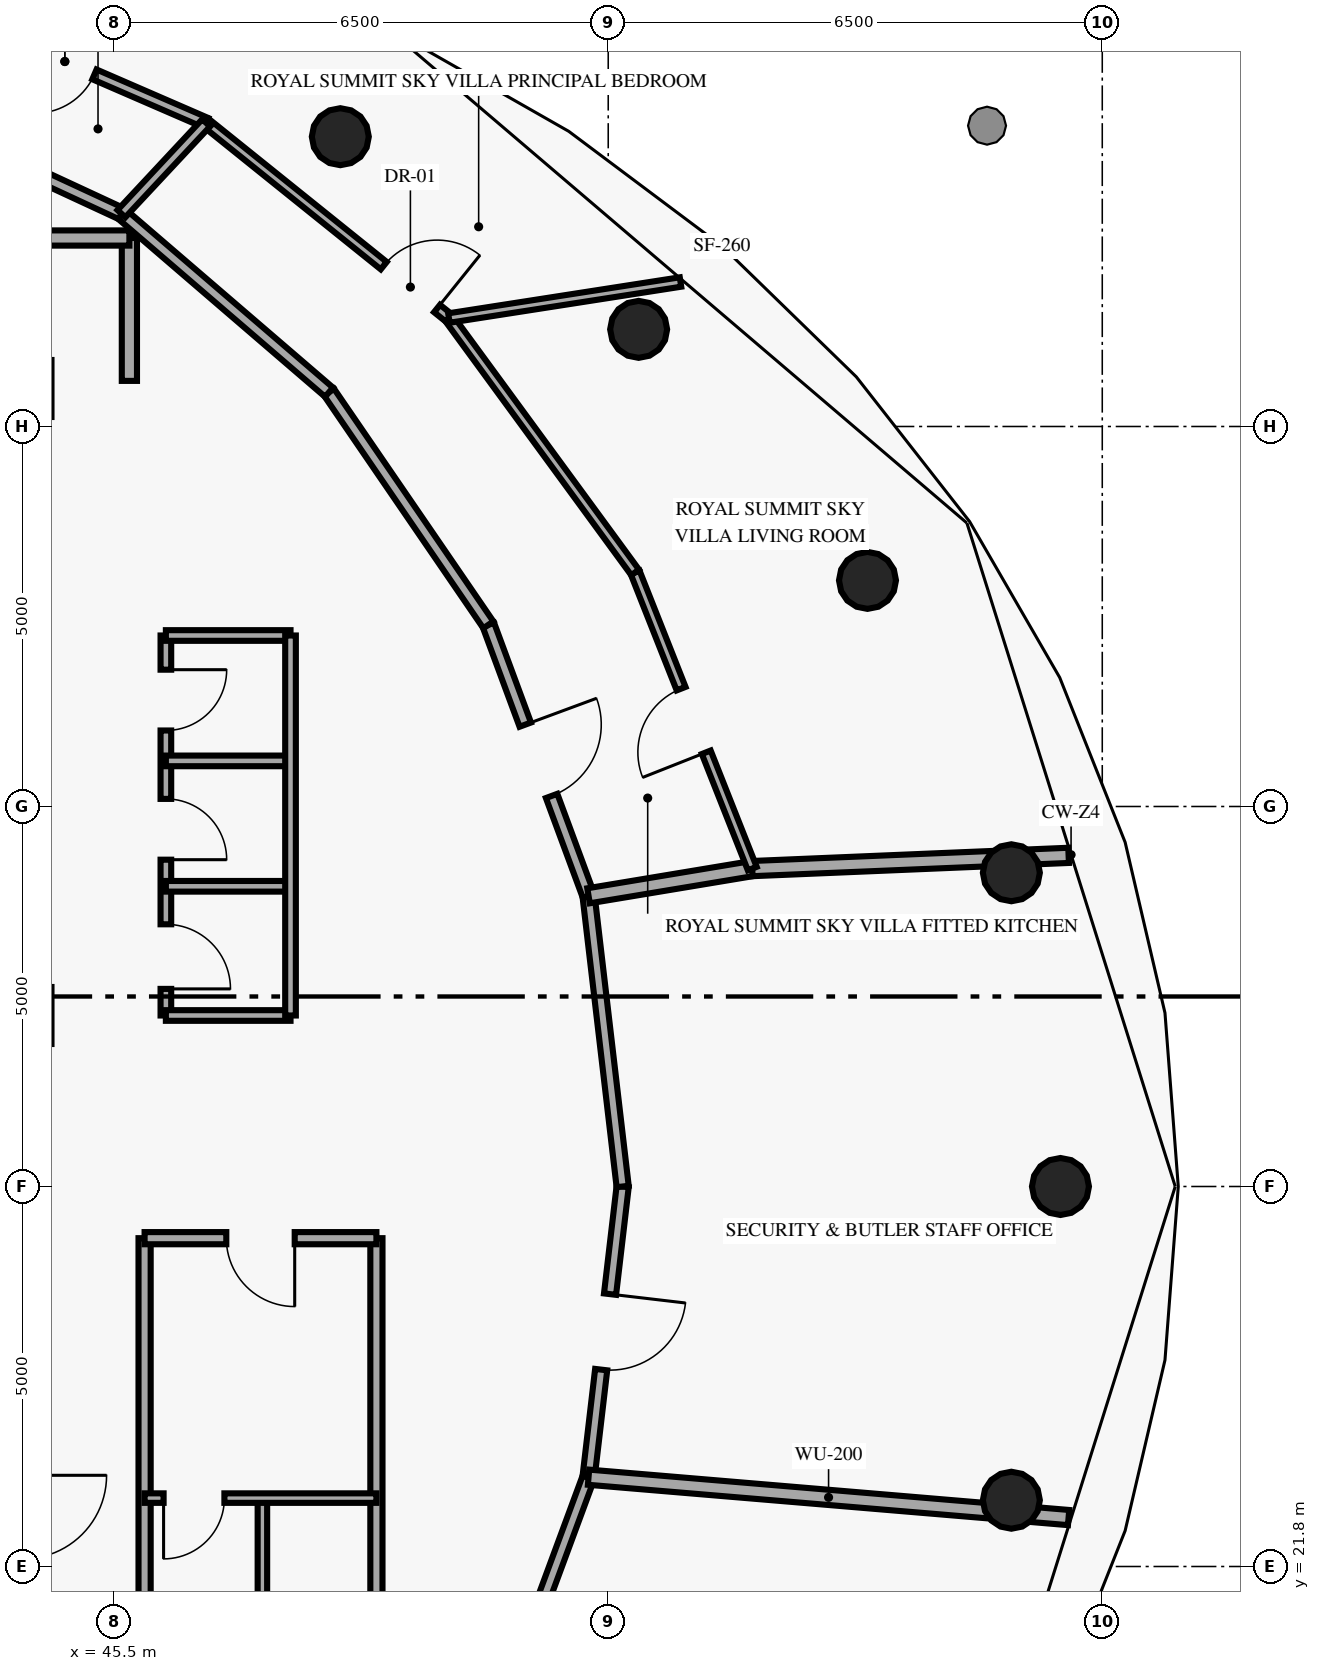
"""IFC4 building model, lengths in metres.
Left out: names, types, materials, properties, quantities, classifications, styles, units other than length and angle.
Written with IfcOpenShell. Run it as: python <this file> out.ifc"""

import sys

from ifc_helpers import new_model, si_unit, direction, frame, frame_2d, origin, origin_2d, place, context, subcontext, project, spatial, rectangle, circle, extrude, element, fill, save


model = new_model("IFC4")
c1 = context("Model", 3, precision=1e-05, world=origin(), true_north=direction((0.0, 1.0)))
c2 = subcontext(c1, "Body", "Model", "MODEL_VIEW")
j1 = project(units=[si_unit("LENGTHUNIT", "METRE"), si_unit("PLANEANGLEUNIT", "RADIAN")], contexts=[c1])
p1 = place(None, origin())
s1 = spatial("IfcSite", under=j1, at=p1, CompositionType="ELEMENT")
p2 = place(p1, origin())
s2 = spatial("IfcBuilding", under=s1, at=p2, CompositionType="ELEMENT")
p3 = place(p2, frame((0.0, 0.0, 297.4)))
s3 = spatial("IfcBuildingStorey", under=s2, at=p3, CompositionType="ELEMENT", Elevation=297.4)
for number, where, z_axis, x_axis in (
    (1, (57.95, 26.8, 0.0), (0.0, 0.0, 1.0), (1.0, 0.0, 0.0)),
    (2, (57.304, 30.928, 0.0), (0.0, 0.0, 1.0), (1.0, 0.0, 0.0)),
    (3, (55.411, 34.775, 0.0), (0.0, 0.0, 1.0), (1.0, 0.0, 0.0)),
    (4, (52.4, 38.078, 0.0), (0.0, 0.0, 1.0), (1.0, 0.0, 0.0)),
    (5, (48.475, 40.613, 0.0), (0.0, 0.0, 1.0), (1.0, 0.0, 0.0)),
    (6, (57.304, 22.672, 0.0), (0.0, 0.0, 1.0), (1.0, 0.0, 0.0)),
):
    element("IfcColumn", number, at=place(p3, frame(where, z_axis=z_axis, x_axis=x_axis)), inside=s3, PredefinedType="COLUMN", context=c2, shape_type="SweptSolid", body=[
        extrude(circle(Radius=0.375, at=origin_2d()), origin(), (0.0, 0.0, 1.0), 3.45),
    ])
p4 = place(p3, frame((45.7, 37.4, 0.0), z_axis=(0.0, 0.0, 1.0), x_axis=(0.0, 1.0, 0.0)))
e7 = element("IfcWall", 7, at=p4, inside=s3, PredefinedType="SOLIDWALL", context=c2, shape_type="SweptSolid", body=[
    extrude(rectangle(XDim=1.88, YDim=0.2, at=frame_2d((0.94, 0.0))), origin(), (0.0, 0.0, 1.0), 3.45),
])
p5 = place(p3, frame((45.7, 39.28, 0.0), z_axis=(0.0, 0.0, 1.0), x_axis=(-1.0, 0.0, 0.0)))
e8 = element("IfcWall", 8, at=p5, inside=s3, PredefinedType="SOLIDWALL", context=c2, shape_type="SweptSolid", body=[
    extrude(rectangle(XDim=6.6, YDim=0.2, at=frame_2d((3.3, 0.0))), origin(), (0.0, 0.0, 1.0), 3.45),
])
p6 = place(p5, frame((4.35, 0.0, 0.0)))
e9 = element("IfcOpeningElement", 9, at=p6, cuts=e8, PredefinedType="OPENING", context=c2, shape_type="SweptSolid", body=[
    extrude(rectangle(XDim=1.6, YDim=2.2, at=frame_2d((0.8, 1.1))), frame((0.0, 0.11, 0.0), z_axis=(0.0, -1.0, 0.0), x_axis=(1.0, 0.0, 0.0)), (0.0, 0.0, 1.0), 0.22),
])
for number, where, z_axis, x_axis in (
    (10, (48.95, 19.05, 0.0), (0.0, 0.0, 1.0), (0.0, 1.0, 0.0)),
    (11, (45.9, 19.05, 0.0), (0.0, 0.0, 1.0), (0.0, 1.0, 0.0)),
):
    element("IfcWall", number, at=place(p3, frame(where, z_axis=z_axis, x_axis=x_axis)), inside=s3, PredefinedType="PARTITIONING", context=c2, shape_type="SweptSolid", body=[
        extrude(rectangle(XDim=7.07, YDim=0.16, at=frame_2d((3.535, 0.0))), origin(), (0.0, 0.0, 1.0), 3.45),
    ])
p7 = place(p3, frame((47.45, 22.7, 0.0), z_axis=(0.0, 0.0, 1.0), x_axis=(0.0, -1.0, 0.0)))
e12 = element("IfcWall", 12, at=p7, inside=s3, PredefinedType="PARTITIONING", context=c2, shape_type="SweptSolid", body=[
    extrude(rectangle(XDim=3.65, YDim=0.125, at=frame_2d((1.825, 0.0))), origin(), (0.0, 0.0, 1.0), 3.45),
])
p8 = place(p7, frame((1.425, 0.0, 0.0)))
e13 = element("IfcOpeningElement", 13, at=p8, cuts=e12, PredefinedType="OPENING", context=c2, shape_type="SweptSolid", body=[
    extrude(rectangle(XDim=0.8, YDim=2.05, at=frame_2d((0.4, 1.025))), frame((0.0, 0.073, 0.0), z_axis=(0.0, -1.0, 0.0), x_axis=(1.0, 0.0, 0.0)), (0.0, 0.0, 1.0), 0.145),
])
p9 = place(p3, frame((48.95, 22.7, 0.0), z_axis=(0.0, 0.0, 1.0), x_axis=(-1.0, 0.0, 0.0)))
e14 = element("IfcWall", 14, at=p9, inside=s3, PredefinedType="PARTITIONING", context=c2, shape_type="SweptSolid", body=[
    extrude(rectangle(XDim=3.05, YDim=0.125, at=frame_2d((1.525, 0.0))), origin(), (0.0, 0.0, 1.0), 3.45),
])
p10 = place(p9, frame((2.0, 0.0, 0.0)))
e15 = element("IfcOpeningElement", 15, at=p10, cuts=e14, PredefinedType="OPENING", context=c2, shape_type="SweptSolid", body=[
    extrude(rectangle(XDim=0.8, YDim=2.05, at=frame_2d((0.4, 1.025))), frame((0.0, 0.073, 0.0), z_axis=(0.0, -1.0, 0.0), x_axis=(1.0, 0.0, 0.0)), (0.0, 0.0, 1.0), 0.145),
])
p11 = place(p3, frame((48.95, 26.12, 0.0), z_axis=(0.0, 0.0, 1.0), x_axis=(-1.0, 0.0, 0.0)))
e16 = element("IfcWall", 16, at=p11, inside=s3, PredefinedType="PARTITIONING", context=c2, shape_type="SweptSolid", body=[
    extrude(rectangle(XDim=3.05, YDim=0.16, at=frame_2d((1.525, 0.0))), origin(), (0.0, 0.0, 1.0), 3.45),
])
p12 = place(p11, frame((1.075, 0.0, 0.0)))
e17 = element("IfcOpeningElement", 17, at=p12, cuts=e16, PredefinedType="OPENING", context=c2, shape_type="SweptSolid", body=[
    extrude(rectangle(XDim=0.9, YDim=2.1, at=frame_2d((0.45, 1.05))), frame((0.0, 0.09, 0.0), z_axis=(0.0, -1.0, 0.0), x_axis=(1.0, 0.0, 0.0)), (0.0, 0.0, 1.0), 0.18),
])
p13 = place(p3, frame((46.18, 34.05, 0.0), z_axis=(0.0, 0.0, 1.0), x_axis=(0.0, -1.0, 0.0)))
e18 = element("IfcWall", 18, at=p13, inside=s3, PredefinedType="PARTITIONING", context=c2, shape_type="SweptSolid", body=[
    extrude(rectangle(XDim=5.0, YDim=0.14, at=frame_2d((2.5, 0.0))), origin(), (0.0, 0.0, 1.0), 3.45),
])
p14 = place(p13, frame((3.8, 0.0, 0.0)))
e19 = element("IfcOpeningElement", 19, at=p14, cuts=e18, PredefinedType="OPENING", context=c2, shape_type="SweptSolid", body=[
    extrude(rectangle(XDim=0.85, YDim=2.1, at=frame_2d((0.425, 1.05))), frame((0.0, 0.08, 0.0), z_axis=(0.0, -1.0, 0.0), x_axis=(1.0, 0.0, 0.0)), (0.0, 0.0, 1.0), 0.16),
])
p15 = place(p13, frame((2.15, 0.0, 0.0)))
e20 = element("IfcOpeningElement", 20, at=p15, cuts=e18, PredefinedType="OPENING", context=c2, shape_type="SweptSolid", body=[
    extrude(rectangle(XDim=0.8, YDim=2.05, at=frame_2d((0.4, 1.025))), frame((0.0, 0.08, 0.0), z_axis=(0.0, -1.0, 0.0), x_axis=(1.0, 0.0, 0.0)), (0.0, 0.0, 1.0), 0.16),
])
p16 = place(p13, frame((0.45, 0.0, 0.0)))
e21 = element("IfcOpeningElement", 21, at=p16, cuts=e18, PredefinedType="OPENING", context=c2, shape_type="SweptSolid", body=[
    extrude(rectangle(XDim=0.8, YDim=2.05, at=frame_2d((0.4, 1.025))), frame((0.0, 0.08, 0.0), z_axis=(0.0, -1.0, 0.0), x_axis=(1.0, 0.0, 0.0)), (0.0, 0.0, 1.0), 0.16),
])
for number, where, z_axis, x_axis in (
    (22, (46.18, 29.05, 0.0), (0.0, 0.0, 1.0), (1.0, 0.0, 0.0)),
    (23, (46.18, 30.75, 0.0), (0.0, 0.0, 1.0), (1.0, 0.0, 0.0)),
    (24, (46.18, 32.4, 0.0), (0.0, 0.0, 1.0), (1.0, 0.0, 0.0)),
    (25, (46.18, 34.05, 0.0), (0.0, 0.0, 1.0), (1.0, 0.0, 0.0)),
):
    element("IfcWall", number, at=place(p3, frame(where, z_axis=z_axis, x_axis=x_axis)), inside=s3, PredefinedType="PARTITIONING", context=c2, shape_type="SweptSolid", body=[
        extrude(rectangle(XDim=1.64, YDim=0.14, at=frame_2d((0.82, 0.0))), origin(), (0.0, 0.0, 1.0), 3.45),
    ])
p17 = place(p3, frame((47.82, 29.05, 0.0), z_axis=(0.0, 0.0, 1.0), x_axis=(0.0, 1.0, 0.0)))
e26 = element("IfcWall", 26, at=p17, inside=s3, PredefinedType="PARTITIONING", context=c2, shape_type="SweptSolid", body=[
    extrude(rectangle(XDim=5.0, YDim=0.14, at=frame_2d((2.5, 0.0))), origin(), (0.0, 0.0, 1.0), 3.45),
])
p18 = place(p3, frame((50.423, 19.41, 0.0), z_axis=(0.0, 0.0, 1.0), x_axis=(0.346720166633, 0.937968616773, 0.0)))
e27 = element("IfcWall", 27, at=p18, inside=s3, PredefinedType="PARTITIONING", context=c2, shape_type="SweptSolid", body=[
    extrude(rectangle(XDim=3.801, YDim=0.16, at=frame_2d((1.9, 0.0))), origin(), (0.0, 0.0, 1.0), 3.45),
])
p19 = place(p3, frame((52.19, 26.8, 0.0), z_axis=(0.0, 0.0, 1.0), x_axis=(-0.116580098154, -0.993181292974, 0.0)))
e28 = element("IfcWall", 28, at=p19, inside=s3, PredefinedType="PARTITIONING", context=c2, shape_type="SweptSolid", body=[
    extrude(rectangle(XDim=3.851, YDim=0.16, at=frame_2d((1.926, 0.0))), origin(), (0.0, 0.0, 1.0), 3.45),
])
p20 = place(p19, frame((1.426, 0.0, 0.0)))
e29 = element("IfcOpeningElement", 29, at=p20, cuts=e28, PredefinedType="OPENING", context=c2, shape_type="SweptSolid", body=[
    extrude(rectangle(XDim=1.0, YDim=2.15, at=frame_2d((0.5, 1.075))), frame((0.0, 0.09, 0.0), z_axis=(0.0, -1.0, 0.0), x_axis=(1.0, 0.0, 0.0)), (0.0, 0.0, 1.0), 0.18),
])
p21 = place(p3, frame((52.19, 26.8, 0.0), z_axis=(0.0, 0.0, 1.0), x_axis=(-0.116580098154, 0.993181292974, 0.0)))
e30 = element("IfcWall", 30, at=p21, inside=s3, PredefinedType="PARTITIONING", context=c2, shape_type="SweptSolid", body=[
    extrude(rectangle(XDim=3.851, YDim=0.16, at=frame_2d((1.926, 0.0))), origin(), (0.0, 0.0, 1.0), 3.45),
])
p22 = place(p3, frame((50.423, 34.19, 0.0), z_axis=(0.0, 0.0, 1.0), x_axis=(0.346741056612, -0.937960894526, 0.0)))
e31 = element("IfcWall", 31, at=p22, inside=s3, PredefinedType="PARTITIONING", context=c2, shape_type="SweptSolid", body=[
    extrude(rectangle(XDim=3.801, YDim=0.16, at=frame_2d((1.9, 0.0))), origin(), (0.0, 0.0, 1.0), 3.45),
])
p23 = place(p22, frame((1.4, 0.0, 0.0)))
e32 = element("IfcOpeningElement", 32, at=p23, cuts=e31, PredefinedType="OPENING", context=c2, shape_type="SweptSolid", body=[
    extrude(rectangle(XDim=1.0, YDim=2.15, at=frame_2d((0.5, 1.075))), frame((0.0, 0.09, 0.0), z_axis=(0.0, -1.0, 0.0), x_axis=(1.0, 0.0, 0.0)), (0.0, 0.0, 1.0), 0.18),
])
p24 = place(p3, frame((50.423, 34.19, 0.0), z_axis=(0.0, 0.0, 1.0), x_axis=(-0.565014144236, 0.825081218313, 0.0)))
e33 = element("IfcWall", 33, at=p24, inside=s3, PredefinedType="PARTITIONING", context=c2, shape_type="SweptSolid", body=[
    extrude(rectangle(XDim=3.71, YDim=0.16, at=frame_2d((1.855, 0.0))), origin(), (0.0, 0.0, 1.0), 3.45),
])
p25 = place(p3, frame((48.327, 37.251, 0.0), z_axis=(0.0, 0.0, 1.0), x_axis=(-0.758232091793, 0.651984735231, 0.0)))
e34 = element("IfcWall", 34, at=p25, inside=s3, PredefinedType="PARTITIONING", context=c2, shape_type="SweptSolid", body=[
    extrude(rectangle(XDim=3.603, YDim=0.16, at=frame_2d((1.802, 0.0))), origin(), (0.0, 0.0, 1.0), 3.45),
])
p26 = place(p3, frame((45.595, 39.6, 0.0), z_axis=(0.0, 0.0, 1.0), x_axis=(-0.907123576348, 0.420864369166, 0.0)))
e35 = element("IfcWall", 35, at=p26, inside=s3, PredefinedType="PARTITIONING", context=c2, shape_type="SweptSolid", body=[
    extrude(rectangle(XDim=3.719, YDim=0.16, at=frame_2d((1.859, 0.0))), origin(), (0.0, 0.0, 1.0), 3.45),
])
p27 = place(p3, frame((51.741, 22.975, 0.0), z_axis=(0.0, 0.0, 1.0), x_axis=(0.996484389559, -0.083778645044, 0.0)))
e36 = element("IfcWall", 36, at=p27, inside=s3, PredefinedType="PARTITIONING", context=c2, shape_type="SweptSolid", body=[
    extrude(rectangle(XDim=6.338, YDim=0.2, at=frame_2d((3.169, 0.0))), origin(), (0.0, 0.0, 1.0), 3.45),
])
p28 = place(p3, frame((51.741, 30.625, 0.0), z_axis=(0.0, 0.0, 1.0), x_axis=(0.986475391434, 0.163909432601, 0.0)))
e37 = element("IfcWall", 37, at=p28, inside=s3, PredefinedType="PARTITIONING", context=c2, shape_type="SweptSolid", body=[
    extrude(rectangle(XDim=2.184, YDim=0.2, at=frame_2d((1.092, 0.0))), origin(), (0.0, 0.0, 1.0), 3.45),
])
p29 = place(p3, frame((53.895, 30.983, 0.0), z_axis=(0.0, 0.0, 1.0), x_axis=(0.999126458002, 0.041789004784, 0.0)))
e38 = element("IfcWall", 38, at=p29, inside=s3, PredefinedType="PARTITIONING", context=c2, shape_type="SweptSolid", body=[
    extrude(rectangle(XDim=4.166, YDim=0.2, at=frame_2d((2.083, 0.0))), origin(), (0.0, 0.0, 1.0), 3.45),
])
p30 = place(p3, frame((52.354, 34.88, 0.0), z_axis=(0.0, 0.0, 1.0), x_axis=(0.367731535022, -0.929931996519, 0.0)))
e39 = element("IfcWall", 39, at=p30, inside=s3, PredefinedType="PARTITIONING", context=c2, shape_type="SweptSolid", body=[
    extrude(rectangle(XDim=4.191, YDim=0.125, at=frame_2d((2.095, 0.0))), origin(), (0.0, 0.0, 1.0), 3.45),
])
p31 = place(p30, frame((1.645, 0.0, 0.0)))
e40 = element("IfcOpeningElement", 40, at=p31, cuts=e39, PredefinedType="OPENING", context=c2, shape_type="SweptSolid", body=[
    extrude(rectangle(XDim=0.9, YDim=2.1, at=frame_2d((0.45, 1.05))), frame((0.0, 0.073, 0.0), z_axis=(0.0, -1.0, 0.0), x_axis=(1.0, 0.0, 0.0)), (0.0, 0.0, 1.0), 0.145),
])
p32 = place(p3, frame((52.354, 34.88, 0.0), z_axis=(0.0, 0.0, 1.0), x_axis=(-0.590636208364, 0.806937958811, 0.0)))
e41 = element("IfcWall", 41, at=p32, inside=s3, PredefinedType="PARTITIONING", context=c2, shape_type="SweptSolid", body=[
    extrude(rectangle(XDim=4.148, YDim=0.125, at=frame_2d((2.074, 0.0))), origin(), (0.0, 0.0, 1.0), 3.45),
])
p33 = place(p3, frame((46.71, 40.795, 0.0), z_axis=(0.0, 0.0, 1.0), x_axis=(0.779367114883, -0.62656755441, 0.0)))
e42 = element("IfcWall", 42, at=p33, inside=s3, PredefinedType="PARTITIONING", context=c2, shape_type="SweptSolid", body=[
    extrude(rectangle(XDim=4.098, YDim=0.125, at=frame_2d((2.049, 0.0))), origin(), (0.0, 0.0, 1.0), 3.45),
])
p34 = place(p33, frame((2.998, 0.0, 0.0)))
e43 = element("IfcOpeningElement", 43, at=p34, cuts=e42, PredefinedType="OPENING", context=c2, shape_type="SweptSolid", body=[
    extrude(rectangle(XDim=0.9, YDim=2.1, at=frame_2d((0.45, 1.05))), frame((0.0, 0.073, 0.0), z_axis=(0.0, -1.0, 0.0), x_axis=(1.0, 0.0, 0.0)), (0.0, 0.0, 1.0), 0.145),
])
p35 = place(p3, frame((42.991, 42.409, 0.0), z_axis=(0.0, 0.0, 1.0), x_axis=(0.917335052278, -0.398116065818, 0.0)))
e44 = element("IfcWall", 44, at=p35, inside=s3, PredefinedType="PARTITIONING", context=c2, shape_type="SweptSolid", body=[
    extrude(rectangle(XDim=4.054, YDim=0.14, at=frame_2d((2.027, 0.0))), origin(), (0.0, 0.0, 1.0), 3.45),
])
p36 = place(p35, frame((1.602, 0.0, 0.0)))
e45 = element("IfcOpeningElement", 45, at=p36, cuts=e44, PredefinedType="OPENING", context=c2, shape_type="SweptSolid", body=[
    extrude(rectangle(XDim=0.85, YDim=2.1, at=frame_2d((0.425, 1.05))), frame((0.0, 0.08, 0.0), z_axis=(0.0, -1.0, 0.0), x_axis=(1.0, 0.0, 0.0)), (0.0, 0.0, 1.0), 0.16),
])
p37 = place(p3, frame((45.595, 39.6, 0.0), z_axis=(0.0, 0.0, 1.0), x_axis=(0.682259699027, 0.731109911767, 0.0)))
e46 = element("IfcWall", 46, at=p37, inside=s3, PredefinedType="PARTITIONING", context=c2, shape_type="SweptSolid", body=[
    extrude(rectangle(XDim=1.634, YDim=0.14, at=frame_2d((0.817, 0.0))), origin(), (0.0, 0.0, 1.0), 3.45),
])
p38 = place(p3, frame((49.904, 38.227, 0.0), z_axis=(0.0, 0.0, 1.0), x_axis=(0.988120477063, 0.153681237659, 0.0)))
e47 = element("IfcWall", 47, at=p38, inside=s3, PredefinedType="PARTITIONING", context=c2, shape_type="SweptSolid", body=[
    extrude(rectangle(XDim=3.083, YDim=0.125, at=frame_2d((1.542, 0.0))), origin(), (0.0, 0.0, 1.0), 3.45),
])
p39 = place(p10, origin())
e48 = element("IfcDoor", 48, at=p39, inside=s3, OperationType="SINGLE_SWING_RIGHT", PredefinedType="DOOR", context=c2, shape_type="SweptSolid", body=[
    extrude(rectangle(XDim=0.8, YDim=2.05, at=frame_2d((0.4, 1.025))), frame((0.0, 0.025, 0.0), z_axis=(0.0, -1.0, 0.0), x_axis=(1.0, 0.0, 0.0)), (0.0, 0.0, 1.0), 0.05),
])
fill(e15, e48)
p40 = place(p12, origin())
e49 = element("IfcDoor", 49, at=p40, inside=s3, OperationType="SINGLE_SWING_LEFT", PredefinedType="DOOR", context=c2, shape_type="SweptSolid", body=[
    extrude(rectangle(XDim=0.9, YDim=2.1, at=frame_2d((0.45, 1.05))), frame((0.0, 0.025, 0.0), z_axis=(0.0, -1.0, 0.0), x_axis=(1.0, 0.0, 0.0)), (0.0, 0.0, 1.0), 0.05),
])
fill(e17, e49)
p41 = place(p14, origin())
e50 = element("IfcDoor", 50, at=p41, inside=s3, OperationType="SINGLE_SWING_RIGHT", PredefinedType="DOOR", context=c2, shape_type="SweptSolid", body=[
    extrude(rectangle(XDim=0.85, YDim=2.1, at=frame_2d((0.425, 1.05))), frame((0.0, 0.025, 0.0), z_axis=(0.0, -1.0, 0.0), x_axis=(1.0, 0.0, 0.0)), (0.0, 0.0, 1.0), 0.05),
])
fill(e19, e50)
p42 = place(p15, origin())
e51 = element("IfcDoor", 51, at=p42, inside=s3, OperationType="SINGLE_SWING_RIGHT", PredefinedType="DOOR", context=c2, shape_type="SweptSolid", body=[
    extrude(rectangle(XDim=0.8, YDim=2.05, at=frame_2d((0.4, 1.025))), frame((0.0, 0.025, 0.0), z_axis=(0.0, -1.0, 0.0), x_axis=(1.0, 0.0, 0.0)), (0.0, 0.0, 1.0), 0.05),
])
fill(e20, e51)
p43 = place(p16, origin())
e52 = element("IfcDoor", 52, at=p43, inside=s3, OperationType="SINGLE_SWING_LEFT", PredefinedType="DOOR", context=c2, shape_type="SweptSolid", body=[
    extrude(rectangle(XDim=0.8, YDim=2.05, at=frame_2d((0.4, 1.025))), frame((0.0, 0.025, 0.0), z_axis=(0.0, -1.0, 0.0), x_axis=(1.0, 0.0, 0.0)), (0.0, 0.0, 1.0), 0.05),
])
fill(e21, e52)
p44 = place(p20, origin())
e53 = element("IfcDoor", 53, at=p44, inside=s3, OperationType="SINGLE_SWING_LEFT", PredefinedType="DOOR", context=c2, shape_type="SweptSolid", body=[
    extrude(rectangle(XDim=1.0, YDim=2.15, at=frame_2d((0.5, 1.075))), frame((0.0, 0.025, 0.0), z_axis=(0.0, -1.0, 0.0), x_axis=(1.0, 0.0, 0.0)), (0.0, 0.0, 1.0), 0.05),
])
fill(e29, e53)
p45 = place(p23, origin())
e54 = element("IfcDoor", 54, at=p45, inside=s3, OperationType="SINGLE_SWING_LEFT", PredefinedType="DOOR", context=c2, shape_type="SweptSolid", body=[
    extrude(rectangle(XDim=1.0, YDim=2.15, at=frame_2d((0.5, 1.075))), frame((0.0, 0.025, 0.0), z_axis=(0.0, -1.0, 0.0), x_axis=(1.0, 0.0, 0.0)), (0.0, 0.0, 1.0), 0.05),
])
fill(e32, e54)
p46 = place(p31, origin())
e55 = element("IfcDoor", 55, at=p46, inside=s3, OperationType="SINGLE_SWING_RIGHT", PredefinedType="DOOR", context=c2, shape_type="SweptSolid", body=[
    extrude(rectangle(XDim=0.9, YDim=2.1, at=frame_2d((0.45, 1.05))), frame((0.0, 0.025, 0.0), z_axis=(0.0, -1.0, 0.0), x_axis=(1.0, 0.0, 0.0)), (0.0, 0.0, 1.0), 0.05),
])
fill(e40, e55)
p47 = place(p34, origin())
e56 = element("IfcDoor", 56, at=p47, inside=s3, OperationType="SINGLE_SWING_RIGHT", PredefinedType="DOOR", context=c2, shape_type="SweptSolid", body=[
    extrude(rectangle(XDim=0.9, YDim=2.1, at=frame_2d((0.45, 1.05))), frame((0.0, 0.025, 0.0), z_axis=(0.0, -1.0, 0.0), x_axis=(1.0, 0.0, 0.0)), (0.0, 0.0, 1.0), 0.05),
])
fill(e43, e56)
p48 = place(p36, origin())
e57 = element("IfcDoor", 57, at=p48, inside=s3, OperationType="SINGLE_SWING_LEFT", PredefinedType="DOOR", context=c2, shape_type="SweptSolid", body=[
    extrude(rectangle(XDim=0.85, YDim=2.1, at=frame_2d((0.425, 1.05))), frame((0.0, 0.025, 0.0), z_axis=(0.0, -1.0, 0.0), x_axis=(1.0, 0.0, 0.0)), (0.0, 0.0, 1.0), 0.05),
])
fill(e45, e57)
save(model, sys.argv[1])
